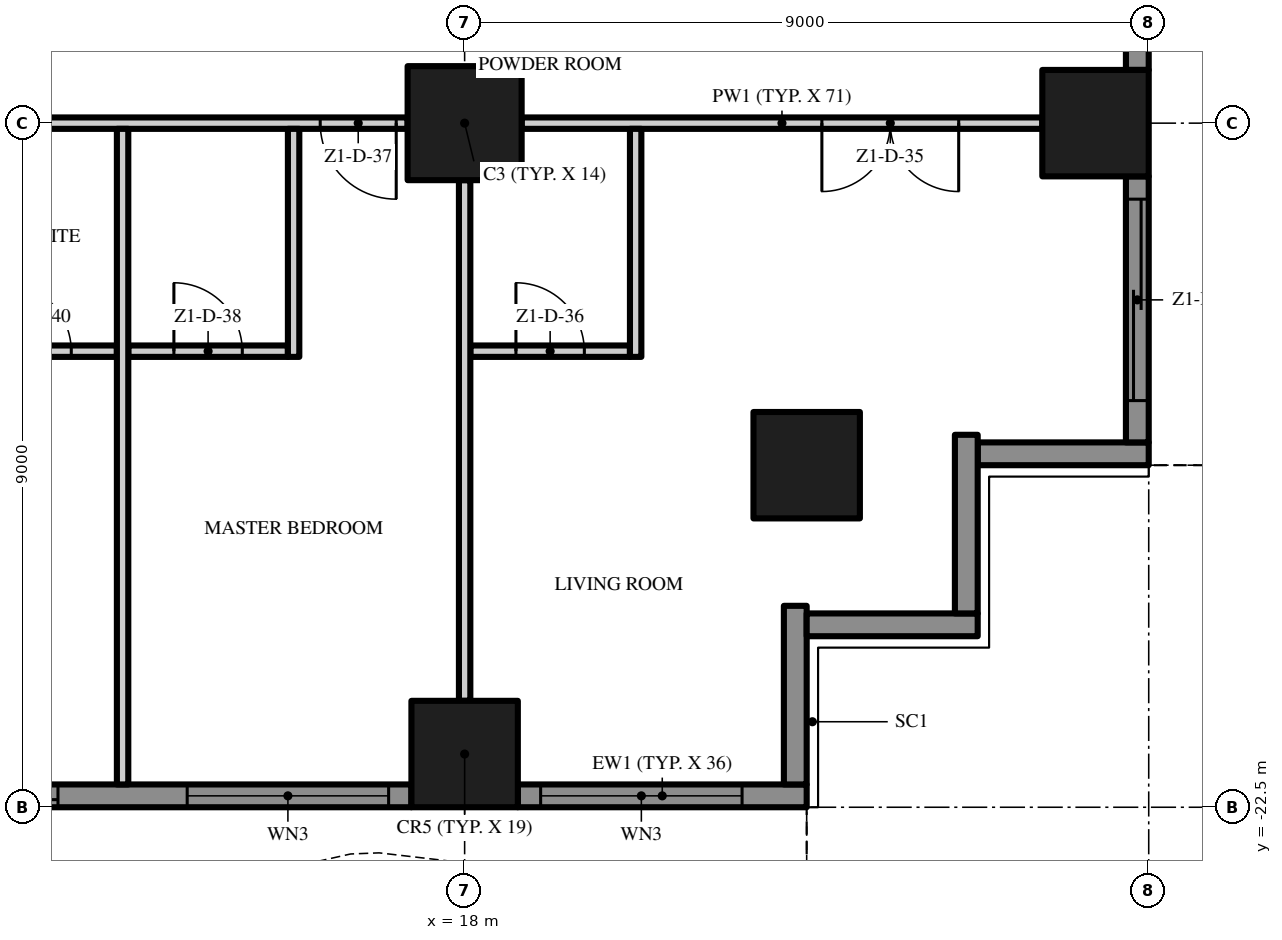
"""IFC4 building model, lengths in metres.
Left out: names, types, materials, properties, quantities, classifications, styles, units other than length and angle.
Written with IfcOpenShell. Run it as: python <this file> out.ifc"""

import sys

from ifc_helpers import new_model, si_unit, direction, frame, frame_2d, origin, origin_2d, place, context, subcontext, project, spatial, polyline, rectangle, outline, extrude, element, fill, save


model = new_model("IFC4")
c1 = context("Model", 3, precision=1e-05, world=origin(), true_north=direction((0.0, 1.0)))
c2 = subcontext(c1, "Body", "Model", "MODEL_VIEW")
j1 = project(units=[si_unit("LENGTHUNIT", "METRE"), si_unit("PLANEANGLEUNIT", "RADIAN")], contexts=[c1])
p1 = place(None, origin())
s1 = spatial("IfcSite", under=j1, at=p1, CompositionType="ELEMENT")
p2 = place(p1, origin())
s2 = spatial("IfcBuilding", under=s1, at=p2, CompositionType="ELEMENT")
p3 = place(p2, frame((0.0, 0.0, 49.2)))
s3 = spatial("IfcBuildingStorey", under=s2, at=p3, CompositionType="ELEMENT", Elevation=49.2)
p4 = place(p3, frame((18.0, -13.5, 0.0), z_axis=(0.0, 0.0, 1.0), x_axis=(1.0, 0.0, 0.0)))
e1 = element("IfcColumn", 1, at=p4, inside=s3, PredefinedType="COLUMN", context=c2, shape_type="SweptSolid", body=[
    extrude(rectangle(XDim=1.5, YDim=1.5, at=origin_2d()), origin(), (0.0, 0.0, 1.0), 3.5),
])
for number, where, z_axis, x_axis in (
    (2, (18.0, -21.8, 0.0), (0.0, 0.0, 1.0), (1.0, 0.0, 0.0)),
    (3, (26.3, -13.5, 0.0), (0.0, 0.0, 1.0), (1.0, 0.0, 0.0)),
    (4, (22.5, -18.0, 0.0), (0.0, 0.0, 1.0), (1.0, 0.0, 0.0)),
):
    element("IfcColumn", number, at=place(p3, frame(where, z_axis=z_axis, x_axis=x_axis)), inside=s3, PredefinedType="COLUMN", context=c2, shape_type="SweptSolid", body=[
        extrude(rectangle(XDim=1.4, YDim=1.4, at=origin_2d()), origin(), (0.0, 0.0, 1.0), 3.5),
    ])
p5 = place(p3, frame((17.3, -22.35, 0.0), z_axis=(0.0, 0.0, 1.0), x_axis=(-1.0, 0.0, 0.0)))
e5 = element("IfcWall", 5, at=p5, inside=s3, PredefinedType="SOLIDWALL", context=c2, shape_type="SweptSolid", body=[
    extrude(rectangle(XDim=7.6, YDim=0.3, at=frame_2d((3.8, 0.0))), origin(), (0.0, 0.0, 1.0), 3.5),
])
p6 = place(p5, frame((4.65, 0.0, 0.0)))
e6 = element("IfcOpeningElement", 6, at=p6, cuts=e5, PredefinedType="OPENING", context=c2, shape_type="SweptSolid", body=[
    extrude(rectangle(XDim=2.65, YDim=2.4, at=frame_2d((1.325, 1.2))), frame((0.0, 0.16, 0.0), z_axis=(0.0, -1.0, 0.0), x_axis=(1.0, 0.0, 0.0)), (0.0, 0.0, 1.0), 0.32),
])
p7 = place(p5, frame((0.3, 0.0, 0.45)))
e7 = element("IfcOpeningElement", 7, at=p7, cuts=e5, PredefinedType="OPENING", context=c2, shape_type="SweptSolid", body=[
    extrude(rectangle(XDim=2.65, YDim=2.65, at=frame_2d((1.325, 1.325))), frame((0.0, 0.16, 0.0), z_axis=(0.0, -1.0, 0.0), x_axis=(1.0, 0.0, 0.0)), (0.0, 0.0, 1.0), 0.32),
])
p8 = place(p3, frame((22.5, -22.35, 0.0), z_axis=(0.0, 0.0, 1.0), x_axis=(-1.0, 0.0, 0.0)))
e8 = element("IfcWall", 8, at=p8, inside=s3, PredefinedType="SOLIDWALL", context=c2, shape_type="SweptSolid", body=[
    extrude(rectangle(XDim=3.8, YDim=0.3, at=frame_2d((1.9, 0.0))), origin(), (0.0, 0.0, 1.0), 3.5),
])
p9 = place(p8, frame((0.85, 0.0, 0.45)))
e9 = element("IfcOpeningElement", 9, at=p9, cuts=e8, PredefinedType="OPENING", context=c2, shape_type="SweptSolid", body=[
    extrude(rectangle(XDim=2.65, YDim=2.65, at=frame_2d((1.325, 1.325))), frame((0.0, 0.16, 0.0), z_axis=(0.0, -1.0, 0.0), x_axis=(1.0, 0.0, 0.0)), (0.0, 0.0, 1.0), 0.32),
])
p10 = place(p3, frame((22.35, -19.85, 0.0), z_axis=(0.0, 0.0, 1.0), x_axis=(0.0, -1.0, 0.0)))
e10 = element("IfcWall", 10, at=p10, inside=s3, PredefinedType="SOLIDWALL", context=c2, shape_type="SweptSolid", body=[
    extrude(rectangle(XDim=2.35, YDim=0.3, at=frame_2d((1.175, 0.0))), origin(), (0.0, 0.0, 1.0), 3.5),
])
p11 = place(p3, frame((24.75, -20.1, 0.0), z_axis=(0.0, 0.0, 1.0), x_axis=(-1.0, 0.0, 0.0)))
e11 = element("IfcWall", 11, at=p11, inside=s3, PredefinedType="SOLIDWALL", context=c2, shape_type="SweptSolid", body=[
    extrude(rectangle(XDim=2.25, YDim=0.3, at=frame_2d((1.125, 0.0))), origin(), (0.0, 0.0, 1.0), 3.5),
])
p12 = place(p3, frame((24.6, -17.6, 0.0), z_axis=(0.0, 0.0, 1.0), x_axis=(0.0, -1.0, 0.0)))
e12 = element("IfcWall", 12, at=p12, inside=s3, PredefinedType="SOLIDWALL", context=c2, shape_type="SweptSolid", body=[
    extrude(rectangle(XDim=2.35, YDim=0.3, at=frame_2d((1.175, 0.0))), origin(), (0.0, 0.0, 1.0), 3.5),
])
p13 = place(p3, frame((27.0, -17.85, 0.0), z_axis=(0.0, 0.0, 1.0), x_axis=(-1.0, 0.0, 0.0)))
e13 = element("IfcWall", 13, at=p13, inside=s3, PredefinedType="SOLIDWALL", context=c2, shape_type="SweptSolid", body=[
    extrude(rectangle(XDim=2.25, YDim=0.3, at=frame_2d((1.125, 0.0))), origin(), (0.0, 0.0, 1.0), 3.5),
])
p14 = place(p3, frame((26.85, -14.2, 0.0), z_axis=(0.0, 0.0, 1.0), x_axis=(0.0, -1.0, 0.0)))
e14 = element("IfcWall", 14, at=p14, inside=s3, PredefinedType="SOLIDWALL", context=c2, shape_type="SweptSolid", body=[
    extrude(rectangle(XDim=3.5, YDim=0.3, at=frame_2d((1.75, 0.0))), origin(), (0.0, 0.0, 1.0), 3.5),
])
p15 = place(p14, frame((0.3, 0.0, 0.0)))
e15 = element("IfcOpeningElement", 15, at=p15, cuts=e14, PredefinedType="OPENING", context=c2, shape_type="SweptSolid", body=[
    extrude(rectangle(XDim=2.65, YDim=2.4, at=frame_2d((1.325, 1.2))), frame((0.0, 0.16, 0.0), z_axis=(0.0, -1.0, 0.0), x_axis=(1.0, 0.0, 0.0)), (0.0, 0.0, 1.0), 0.32),
])
p16 = place(p3, frame((26.85, -5.2, 0.0), z_axis=(0.0, 0.0, 1.0), x_axis=(0.0, -1.0, 0.0)))
e16 = element("IfcWall", 16, at=p16, inside=s3, PredefinedType="SOLIDWALL", context=c2, shape_type="SweptSolid", body=[
    extrude(rectangle(XDim=7.6, YDim=0.3, at=frame_2d((3.8, 0.0))), origin(), (0.0, 0.0, 1.0), 3.5),
])
p17 = place(p16, frame((4.65, 0.0, 0.45)))
e17 = element("IfcOpeningElement", 17, at=p17, cuts=e16, PredefinedType="OPENING", context=c2, shape_type="SweptSolid", body=[
    extrude(rectangle(XDim=2.65, YDim=2.65, at=frame_2d((1.325, 1.325))), frame((0.0, 0.16, 0.0), z_axis=(0.0, -1.0, 0.0), x_axis=(1.0, 0.0, 0.0)), (0.0, 0.0, 1.0), 0.32),
])
p18 = place(p16, frame((0.3, 0.0, 0.45)))
e18 = element("IfcOpeningElement", 18, at=p18, cuts=e16, PredefinedType="OPENING", context=c2, shape_type="SweptSolid", body=[
    extrude(rectangle(XDim=2.65, YDim=2.65, at=frame_2d((1.325, 1.325))), frame((0.0, 0.16, 0.0), z_axis=(0.0, -1.0, 0.0), x_axis=(1.0, 0.0, 0.0)), (0.0, 0.0, 1.0), 0.32),
])
p19 = place(p3, origin())
e19 = element("IfcWall", 19, at=p19, inside=s3, PredefinedType="USERDEFINED", context=c2, shape_type="SweptSolid", body=[
    extrude(outline(polyline([(-22.5, -25.149), (-21.0, -25.485), (-20.625, -25.5), (-19.5, -25.369), (-18.0, -24.845), (-16.5, -24.112), (-15.0, -23.451), (-13.5, -23.115), (-13.125, -23.1), (-12.0, -23.231), (-10.5, -23.755), (-9.0, -24.488), (-7.5, -25.149), (-6.0, -25.485), (-5.625, -25.5), (-4.5, -25.369), (-3.0, -24.845), (-1.5, -24.112), (0.0, -23.451), (1.5, -23.115), (1.875, -23.1), (3.0, -23.231), (4.5, -23.755), (6.0, -24.488), (7.5, -25.149), (9.0, -25.485), (9.375, -25.5), (10.5, -25.369), (12.0, -24.845), (13.5, -24.112), (15.0, -23.451), (16.5, -23.115), (16.875, -23.1), (18.0, -23.231), (19.5, -23.755), (21.0, -24.488), (22.5, -25.149), (22.601, -24.92), (21.105, -24.261), (19.596, -23.524), (18.056, -22.986), (16.885, -22.849), (16.467, -22.866), (14.921, -23.213), (13.395, -23.885), (11.904, -24.614), (10.444, -25.124), (9.365, -25.249), (9.033, -25.236), (7.579, -24.91), (6.105, -24.261), (4.596, -23.524), (3.056, -22.986), (1.885, -22.849), (1.467, -22.866), (-0.079, -23.213), (-1.605, -23.885), (-3.096, -24.614), (-4.556, -25.124), (-5.635, -25.249), (-5.967, -25.236), (-7.421, -24.91), (-8.895, -24.261), (-10.404, -23.524), (-11.944, -22.986), (-13.115, -22.849), (-13.533, -22.866), (-15.079, -23.213), (-16.605, -23.885), (-18.096, -24.614), (-19.556, -25.124), (-20.635, -25.249), (-20.967, -25.236), (-22.445, -24.905), (-22.5, -25.149)])), origin(), (0.0, 0.0, 1.0), 0.9),
])
p20 = place(p3, origin())
e20 = element("IfcWall", 20, at=p20, inside=s3, PredefinedType="USERDEFINED", context=c2, shape_type="SweptSolid", body=[
    extrude(outline(polyline([(29.649, -18.0), (29.985, -16.5), (30.0, -16.125), (29.869, -15.0), (29.345, -13.5), (28.612, -12.0), (27.951, -10.5), (27.615, -9.0), (27.6, -8.625), (27.731, -7.5), (28.255, -6.0), (28.988, -4.5), (29.649, -3.0), (29.985, -1.5), (30.0, -1.125), (29.869, 0.0), (29.345, 1.5), (28.612, 3.0), (27.951, 4.5), (27.615, 6.0), (27.6, 6.375), (27.731, 7.5), (28.255, 9.0), (28.988, 10.5), (29.649, 12.0), (29.985, 13.5), (30.0, 13.875), (29.869, 15.0), (29.345, 16.5), (28.612, 18.0), (28.388, 17.89), (29.114, 16.404), (29.624, 14.944), (29.749, 13.865), (29.736, 13.533), (29.41, 12.079), (28.761, 10.605), (28.024, 9.096), (27.486, 7.556), (27.349, 6.385), (27.366, 5.967), (27.713, 4.421), (28.385, 2.895), (29.114, 1.404), (29.624, -0.056), (29.749, -1.135), (29.736, -1.467), (29.41, -2.921), (28.761, -4.395), (28.024, -5.904), (27.486, -7.444), (27.349, -8.615), (27.366, -9.033), (27.713, -10.579), (28.385, -12.105), (29.114, -13.596), (29.624, -15.056), (29.749, -16.135), (29.736, -16.467), (29.405, -17.945), (29.649, -18.0)])), origin(), (0.0, 0.0, 1.0), 0.9),
])
p21 = place(p3, frame((11.325, -16.5, 0.0), z_axis=(0.0, 0.0, 1.0), x_axis=(1.0, 0.0, 0.0)))
e21 = element("IfcWall", 21, at=p21, inside=s3, PredefinedType="PARTITIONING", context=c2, shape_type="SweptSolid", body=[
    extrude(rectangle(XDim=2.1, YDim=0.15, at=frame_2d((1.05, 0.0))), origin(), (0.0, 0.0, 1.0), 3.5),
])
p22 = place(p21, frame((0.6, 0.0, 0.0)))
e22 = element("IfcOpeningElement", 22, at=p22, cuts=e21, PredefinedType="OPENING", context=c2, shape_type="SweptSolid", body=[
    extrude(rectangle(XDim=0.9, YDim=2.1, at=frame_2d((0.45, 1.05))), frame((0.0, 0.085, 0.0), z_axis=(0.0, -1.0, 0.0), x_axis=(1.0, 0.0, 0.0)), (0.0, 0.0, 1.0), 0.17),
])
p23 = place(p3, frame((13.575, -16.5, 0.0), z_axis=(0.0, 0.0, 1.0), x_axis=(1.0, 0.0, 0.0)))
e23 = element("IfcWall", 23, at=p23, inside=s3, PredefinedType="PARTITIONING", context=c2, shape_type="SweptSolid", body=[
    extrude(rectangle(XDim=2.1, YDim=0.15, at=frame_2d((1.05, 0.0))), origin(), (0.0, 0.0, 1.0), 3.5),
])
p24 = place(p23, frame((0.6, 0.0, 0.0)))
e24 = element("IfcOpeningElement", 24, at=p24, cuts=e23, PredefinedType="OPENING", context=c2, shape_type="SweptSolid", body=[
    extrude(rectangle(XDim=0.9, YDim=2.1, at=frame_2d((0.45, 1.05))), frame((0.0, 0.085, 0.0), z_axis=(0.0, -1.0, 0.0), x_axis=(1.0, 0.0, 0.0)), (0.0, 0.0, 1.0), 0.17),
])
p25 = place(p3, frame((18.075, -16.5, 0.0), z_axis=(0.0, 0.0, 1.0), x_axis=(1.0, 0.0, 0.0)))
e25 = element("IfcWall", 25, at=p25, inside=s3, PredefinedType="PARTITIONING", context=c2, shape_type="SweptSolid", body=[
    extrude(rectangle(XDim=2.1, YDim=0.15, at=frame_2d((1.05, 0.0))), origin(), (0.0, 0.0, 1.0), 3.5),
])
p26 = place(p25, frame((0.6, 0.0, 0.0)))
e26 = element("IfcOpeningElement", 26, at=p26, cuts=e25, PredefinedType="OPENING", context=c2, shape_type="SweptSolid", body=[
    extrude(rectangle(XDim=0.9, YDim=2.1, at=frame_2d((0.45, 1.05))), frame((0.0, 0.085, 0.0), z_axis=(0.0, -1.0, 0.0), x_axis=(1.0, 0.0, 0.0)), (0.0, 0.0, 1.0), 0.17),
])
p27 = place(p3, frame((17.25, -13.5, 0.0), z_axis=(0.0, 0.0, 1.0), x_axis=(-1.0, 0.0, 0.0)))
e27 = element("IfcWall", 27, at=p27, inside=s3, PredefinedType="PARTITIONING", context=c2, shape_type="SweptSolid", body=[
    extrude(rectangle(XDim=7.5, YDim=0.15, at=frame_2d((3.75, 0.0))), origin(), (0.0, 0.0, 1.0), 3.5),
])
p28 = place(p27, frame((0.15, 0.0, 0.0)))
e28 = element("IfcOpeningElement", 28, at=p28, cuts=e27, PredefinedType="OPENING", context=c2, shape_type="SweptSolid", body=[
    extrude(rectangle(XDim=1.0, YDim=2.4, at=frame_2d((0.5, 1.2))), frame((0.0, 0.085, 0.0), z_axis=(0.0, -1.0, 0.0), x_axis=(1.0, 0.0, 0.0)), (0.0, 0.0, 1.0), 0.17),
])
p29 = place(p27, frame((6.35, 0.0, 0.0)))
e29 = element("IfcOpeningElement", 29, at=p29, cuts=e27, PredefinedType="OPENING", context=c2, shape_type="SweptSolid", body=[
    extrude(rectangle(XDim=1.0, YDim=2.4, at=frame_2d((0.5, 1.2))), frame((0.0, 0.085, 0.0), z_axis=(0.0, -1.0, 0.0), x_axis=(1.0, 0.0, 0.0)), (0.0, 0.0, 1.0), 0.17),
])
p30 = place(p3, frame((25.6, -13.5, 0.0), z_axis=(0.0, 0.0, 1.0), x_axis=(-1.0, 0.0, 0.0)))
e30 = element("IfcWall", 30, at=p30, inside=s3, PredefinedType="PARTITIONING", context=c2, shape_type="SweptSolid", body=[
    extrude(rectangle(XDim=6.85, YDim=0.15, at=frame_2d((3.425, 0.0))), origin(), (0.0, 0.0, 1.0), 3.5),
])
p31 = place(p30, frame((1.1, 0.0, 0.0)))
e31 = element("IfcOpeningElement", 31, at=p31, cuts=e30, PredefinedType="OPENING", context=c2, shape_type="SweptSolid", body=[
    extrude(rectangle(XDim=1.8, YDim=2.4, at=frame_2d((0.9, 1.2))), frame((0.0, 0.085, 0.0), z_axis=(0.0, -1.0, 0.0), x_axis=(1.0, 0.0, 0.0)), (0.0, 0.0, 1.0), 0.17),
])
p32 = place(p3, frame((13.5, -22.2, 0.0), z_axis=(0.0, 0.0, 1.0), x_axis=(0.0, 1.0, 0.0)))
e32 = element("IfcWall", 32, at=p32, inside=s3, PredefinedType="PARTITIONING", context=c2, shape_type="SweptSolid", body=[
    extrude(rectangle(XDim=8.625, YDim=0.15, at=frame_2d((4.312, 0.0))), origin(), (0.0, 0.0, 1.0), 3.5),
])
p33 = place(p3, frame((15.75, -16.575, 0.0), z_axis=(0.0, 0.0, 1.0), x_axis=(0.0, 1.0, 0.0)))
e33 = element("IfcWall", 33, at=p33, inside=s3, PredefinedType="PARTITIONING", context=c2, shape_type="SweptSolid", body=[
    extrude(rectangle(XDim=3.0, YDim=0.15, at=frame_2d((1.5, 0.0))), origin(), (0.0, 0.0, 1.0), 3.5),
])
p34 = place(p3, frame((18.0, -21.1, 0.0), z_axis=(0.0, 0.0, 1.0), x_axis=(0.0, 1.0, 0.0)))
e34 = element("IfcWall", 34, at=p34, inside=s3, PredefinedType="PARTITIONING", context=c2, shape_type="SweptSolid", body=[
    extrude(rectangle(XDim=6.85, YDim=0.15, at=frame_2d((3.425, 0.0))), origin(), (0.0, 0.0, 1.0), 3.5),
])
p35 = place(p3, frame((20.25, -16.575, 0.0), z_axis=(0.0, 0.0, 1.0), x_axis=(0.0, 1.0, 0.0)))
e35 = element("IfcWall", 35, at=p35, inside=s3, PredefinedType="PARTITIONING", context=c2, shape_type="SweptSolid", body=[
    extrude(rectangle(XDim=3.0, YDim=0.15, at=frame_2d((1.5, 0.0))), origin(), (0.0, 0.0, 1.0), 3.5),
])
p36 = place(p6, origin())
e36 = element("IfcDoor", 36, at=p36, inside=s3, OperationType="SINGLE_SWING_LEFT", PredefinedType="DOOR", context=c2, shape_type="SweptSolid", body=[
    extrude(rectangle(XDim=2.65, YDim=2.4, at=frame_2d((1.325, 1.2))), frame((0.0, 0.025, 0.0), z_axis=(0.0, -1.0, 0.0), x_axis=(1.0, 0.0, 0.0)), (0.0, 0.0, 1.0), 0.05),
])
fill(e6, e36)
p37 = place(p7, origin())
e37 = element("IfcWindow", 37, at=p37, inside=s3, PartitioningType="SINGLE_PANEL", PredefinedType="WINDOW", context=c2, shape_type="SweptSolid", body=[
    extrude(rectangle(XDim=2.65, YDim=2.65, at=frame_2d((1.325, 1.325))), frame((0.0, 0.03, 0.0), z_axis=(0.0, -1.0, 0.0), x_axis=(1.0, 0.0, 0.0)), (0.0, 0.0, 1.0), 0.06),
])
fill(e7, e37)
p38 = place(p9, origin())
e38 = element("IfcWindow", 38, at=p38, inside=s3, PartitioningType="SINGLE_PANEL", PredefinedType="WINDOW", context=c2, shape_type="SweptSolid", body=[
    extrude(rectangle(XDim=2.65, YDim=2.65, at=frame_2d((1.325, 1.325))), frame((0.0, 0.03, 0.0), z_axis=(0.0, -1.0, 0.0), x_axis=(1.0, 0.0, 0.0)), (0.0, 0.0, 1.0), 0.06),
])
fill(e9, e38)
p39 = place(p15, origin())
e39 = element("IfcDoor", 39, at=p39, inside=s3, OperationType="SINGLE_SWING_LEFT", PredefinedType="DOOR", context=c2, shape_type="SweptSolid", body=[
    extrude(rectangle(XDim=2.65, YDim=2.4, at=frame_2d((1.325, 1.2))), frame((0.0, 0.025, 0.0), z_axis=(0.0, -1.0, 0.0), x_axis=(1.0, 0.0, 0.0)), (0.0, 0.0, 1.0), 0.05),
])
fill(e15, e39)
p40 = place(p31, origin())
e40 = element("IfcDoor", 40, at=p40, inside=s3, OperationType="DOUBLE_DOOR_SINGLE_SWING", PredefinedType="DOOR", context=c2, shape_type="SweptSolid", body=[
    extrude(rectangle(XDim=1.8, YDim=2.4, at=frame_2d((0.9, 1.2))), frame((0.0, 0.025, 0.0), z_axis=(0.0, -1.0, 0.0), x_axis=(1.0, 0.0, 0.0)), (0.0, 0.0, 1.0), 0.05),
])
fill(e31, e40)
p41 = place(p26, origin())
e41 = element("IfcDoor", 41, at=p41, inside=s3, OperationType="SINGLE_SWING_LEFT", PredefinedType="DOOR", context=c2, shape_type="SweptSolid", body=[
    extrude(rectangle(XDim=0.9, YDim=2.1, at=frame_2d((0.45, 1.05))), frame((0.0, 0.025, 0.0), z_axis=(0.0, -1.0, 0.0), x_axis=(1.0, 0.0, 0.0)), (0.0, 0.0, 1.0), 0.05),
])
fill(e26, e41)
p42 = place(p28, origin())
e42 = element("IfcDoor", 42, at=p42, inside=s3, OperationType="SINGLE_SWING_LEFT", PredefinedType="DOOR", context=c2, shape_type="SweptSolid", body=[
    extrude(rectangle(XDim=1.0, YDim=2.4, at=frame_2d((0.5, 1.2))), frame((0.0, 0.025, 0.0), z_axis=(0.0, -1.0, 0.0), x_axis=(1.0, 0.0, 0.0)), (0.0, 0.0, 1.0), 0.05),
])
fill(e28, e42)
p43 = place(p24, origin())
e43 = element("IfcDoor", 43, at=p43, inside=s3, OperationType="SINGLE_SWING_LEFT", PredefinedType="DOOR", context=c2, shape_type="SweptSolid", body=[
    extrude(rectangle(XDim=0.9, YDim=2.1, at=frame_2d((0.45, 1.05))), frame((0.0, 0.025, 0.0), z_axis=(0.0, -1.0, 0.0), x_axis=(1.0, 0.0, 0.0)), (0.0, 0.0, 1.0), 0.05),
])
fill(e24, e43)
p44 = place(p22, origin())
e44 = element("IfcDoor", 44, at=p44, inside=s3, OperationType="SINGLE_SWING_LEFT", PredefinedType="DOOR", context=c2, shape_type="SweptSolid", body=[
    extrude(rectangle(XDim=0.9, YDim=2.1, at=frame_2d((0.45, 1.05))), frame((0.0, 0.025, 0.0), z_axis=(0.0, -1.0, 0.0), x_axis=(1.0, 0.0, 0.0)), (0.0, 0.0, 1.0), 0.05),
])
fill(e22, e44)
save(model, sys.argv[1])
